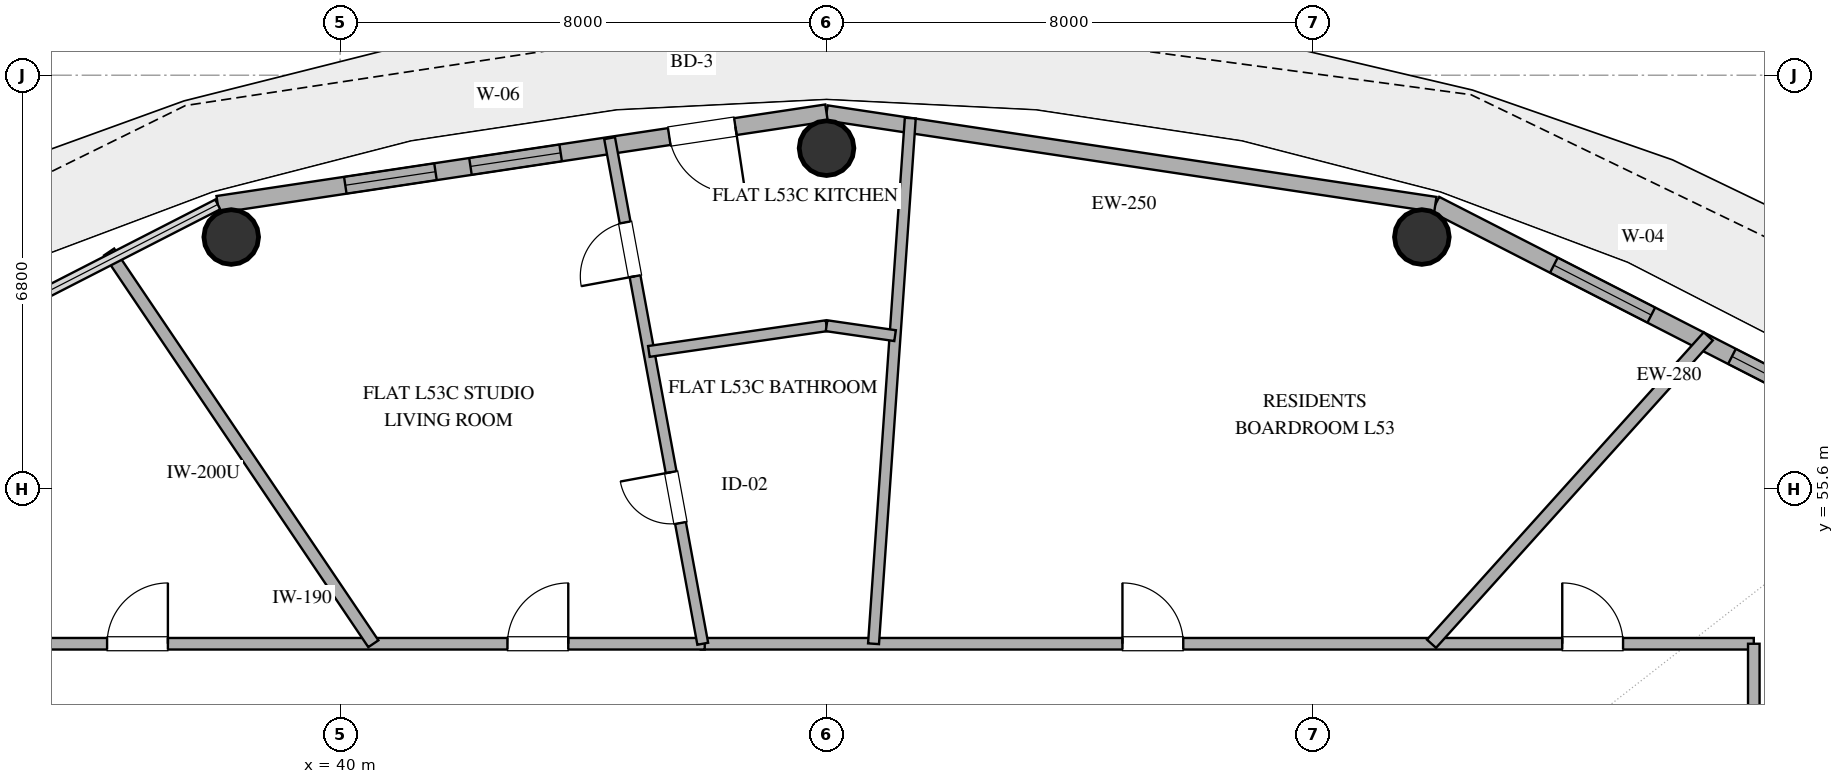
"""IFC4 building model, lengths in metres.
Left out: names, types, materials, properties, quantities, classifications, styles, units other than length and angle.
Written with IfcOpenShell. Run it as: python <this file> out.ifc"""

import sys

from ifc_helpers import new_model, si_unit, direction, frame, frame_2d, origin, origin_2d, place, context, subcontext, project, spatial, rectangle, hollow_circle, extrude, element, fill, save


model = new_model("IFC4")
c1 = context("Model", 3, precision=1e-05, world=origin(), true_north=direction((0.0, 1.0)))
c2 = subcontext(c1, "Body", "Model", "MODEL_VIEW")
j1 = project(units=[si_unit("LENGTHUNIT", "METRE"), si_unit("PLANEANGLEUNIT", "RADIAN")], contexts=[c1])
p1 = place(None, origin())
s1 = spatial("IfcSite", under=j1, at=p1, CompositionType="ELEMENT")
p2 = place(p1, origin())
s2 = spatial("IfcBuilding", under=s1, at=p2, CompositionType="ELEMENT")
p3 = place(p2, frame((0.0, 0.0, 210.0)))
s3 = spatial("IfcBuildingStorey", under=s2, at=p3, CompositionType="ELEMENT", Elevation=210.0)
for number, where, z_axis, x_axis in (
    (1, (57.791, 59.739, 0.0), (0.0, 0.0, 1.0), (1.0, 0.0, 0.0)),
    (2, (48.0, 61.2, 0.0), (0.0, 0.0, 1.0), (1.0, 0.0, 0.0)),
    (3, (38.209, 59.739, 0.0), (0.0, 0.0, 1.0), (1.0, 0.0, 0.0)),
):
    element("IfcColumn", number, at=place(p3, frame(where, z_axis=z_axis, x_axis=x_axis)), inside=s3, PredefinedType="COLUMN", context=c2, shape_type="SweptSolid", body=[
        extrude(hollow_circle(Radius=0.45, WallThickness=0.025, at=origin_2d()), origin(), (0.0, 0.0, 1.0), 3.36),
    ])
p4 = place(p3, frame((66.383, 55.987, 0.0), z_axis=(0.0, 0.0, 1.0), x_axis=(-0.890007394051, 0.455946091699, 0.0)))
e4 = element("IfcWall", 4, at=p4, inside=s3, PredefinedType="SOLIDWALL", context=c2, shape_type="SweptSolid", body=[
    extrude(rectangle(XDim=9.404, YDim=0.28, at=frame_2d((4.702, 0.0))), origin(), (0.0, 0.0, 1.0), 3.36),
])
p5 = place(p4, frame((1.823, 0.0, 0.85)))
e5 = element("IfcOpeningElement", 5, at=p5, cuts=e4, PredefinedType="OPENING", context=c2, shape_type="SweptSolid", body=[
    extrude(rectangle(XDim=2.1, YDim=2.2, at=frame_2d((1.05, 1.1))), frame((0.0, 0.15, 0.0), z_axis=(0.0, -1.0, 0.0), x_axis=(1.0, 0.0, 0.0)), (0.0, 0.0, 1.0), 0.3),
])
p6 = place(p4, frame((5.414, 0.0, 0.85)))
e6 = element("IfcOpeningElement", 6, at=p6, cuts=e4, PredefinedType="OPENING", context=c2, shape_type="SweptSolid", body=[
    extrude(rectangle(XDim=1.8, YDim=2.2, at=frame_2d((0.9, 1.1))), frame((0.0, 0.15, 0.0), z_axis=(0.0, -1.0, 0.0), x_axis=(1.0, 0.0, 0.0)), (0.0, 0.0, 1.0), 0.3),
])
p7 = place(p3, frame((58.013, 60.274, 0.0), z_axis=(0.0, 0.0, 1.0), x_axis=(-0.988882522213, 0.148698881169, 0.0)))
e7 = element("IfcWall", 7, at=p7, inside=s3, PredefinedType="SOLIDWALL", context=c2, shape_type="SweptSolid", body=[
    extrude(rectangle(XDim=10.125, YDim=0.25, at=frame_2d((5.062, 0.0))), origin(), (0.0, 0.0, 1.0), 3.36),
])
p8 = place(p3, frame((48.0, 61.78, 0.0), z_axis=(0.0, 0.0, 1.0), x_axis=(-0.988882522213, -0.148698881169, 0.0)))
e8 = element("IfcWall", 8, at=p8, inside=s3, PredefinedType="SOLIDWALL", context=c2, shape_type="SweptSolid", body=[
    extrude(rectangle(XDim=10.125, YDim=0.28, at=frame_2d((5.062, 0.0))), origin(), (0.0, 0.0, 1.0), 3.36),
])
p9 = place(p8, frame((1.516, 0.0, 0.0)))
e9 = element("IfcOpeningElement", 9, at=p9, cuts=e8, PredefinedType="OPENING", context=c2, shape_type="SweptSolid", body=[
    extrude(rectangle(XDim=1.1, YDim=2.25, at=frame_2d((0.55, 1.125))), frame((0.0, 0.15, 0.0), z_axis=(0.0, -1.0, 0.0), x_axis=(1.0, 0.0, 0.0)), (0.0, 0.0, 1.0), 0.3),
])
p10 = place(p8, frame((4.422, 0.0, 0.85)))
e10 = element("IfcOpeningElement", 10, at=p10, cuts=e8, PredefinedType="OPENING", context=c2, shape_type="SweptSolid", body=[
    extrude(rectangle(XDim=1.5, YDim=2.0, at=frame_2d((0.75, 1.0))), frame((0.0, 0.15, 0.0), z_axis=(0.0, -1.0, 0.0), x_axis=(1.0, 0.0, 0.0)), (0.0, 0.0, 1.0), 0.3),
])
p11 = place(p8, frame((6.504, 0.0, 0.85)))
e11 = element("IfcOpeningElement", 11, at=p11, cuts=e8, PredefinedType="OPENING", context=c2, shape_type="SweptSolid", body=[
    extrude(rectangle(XDim=1.5, YDim=2.0, at=frame_2d((0.75, 1.0))), frame((0.0, 0.15, 0.0), z_axis=(0.0, -1.0, 0.0), x_axis=(1.0, 0.0, 0.0)), (0.0, 0.0, 1.0), 0.3),
])
p12 = place(p3, frame((45.931, 53.05, 0.0), z_axis=(0.0, 0.0, 1.0), x_axis=(1.0, 0.0, 0.0)))
e12 = element("IfcWall", 12, at=p12, inside=s3, PredefinedType="PARTITIONING", context=c2, shape_type="SweptSolid", body=[
    extrude(rectangle(XDim=17.319, YDim=0.19, at=frame_2d((8.659, 0.0))), origin(), (0.0, 0.0, 1.0), 2.72),
])
p13 = place(p12, frame((6.935, 0.0, 0.0)))
e13 = element("IfcOpeningElement", 13, at=p13, cuts=e12, PredefinedType="OPENING", context=c2, shape_type="SweptSolid", body=[
    extrude(rectangle(XDim=1.0, YDim=2.2, at=frame_2d((0.5, 1.1))), frame((0.0, 0.105, 0.0), z_axis=(0.0, -1.0, 0.0), x_axis=(1.0, 0.0, 0.0)), (0.0, 0.0, 1.0), 0.21),
])
p14 = place(p12, frame((14.168, 0.0, 0.0)))
e14 = element("IfcOpeningElement", 14, at=p14, cuts=e12, PredefinedType="OPENING", context=c2, shape_type="SweptSolid", body=[
    extrude(rectangle(XDim=1.0, YDim=2.2, at=frame_2d((0.5, 1.1))), frame((0.0, 0.105, 0.0), z_axis=(0.0, -1.0, 0.0), x_axis=(1.0, 0.0, 0.0)), (0.0, 0.0, 1.0), 0.21),
])
p15 = place(p3, frame((32.75, 53.05, 0.0), z_axis=(0.0, 0.0, 1.0), x_axis=(1.0, 0.0, 0.0)))
e15 = element("IfcWall", 15, at=p15, inside=s3, PredefinedType="PARTITIONING", context=c2, shape_type="SweptSolid", body=[
    extrude(rectangle(XDim=13.247, YDim=0.19, at=frame_2d((6.623, 0.0))), origin(), (0.0, 0.0, 1.0), 2.72),
])
p16 = place(p15, frame((3.417, 0.0, 0.0)))
e16 = element("IfcOpeningElement", 16, at=p16, cuts=e15, PredefinedType="OPENING", context=c2, shape_type="SweptSolid", body=[
    extrude(rectangle(XDim=1.0, YDim=2.2, at=frame_2d((0.5, 1.1))), frame((0.0, 0.105, 0.0), z_axis=(0.0, -1.0, 0.0), x_axis=(1.0, 0.0, 0.0)), (0.0, 0.0, 1.0), 0.21),
])
p17 = place(p15, frame((10.002, 0.0, 0.0)))
e17 = element("IfcOpeningElement", 17, at=p17, cuts=e15, PredefinedType="OPENING", context=c2, shape_type="SweptSolid", body=[
    extrude(rectangle(XDim=1.0, YDim=2.2, at=frame_2d((0.5, 1.1))), frame((0.0, 0.105, 0.0), z_axis=(0.0, -1.0, 0.0), x_axis=(1.0, 0.0, 0.0)), (0.0, 0.0, 1.0), 0.21),
])
p18 = place(p3, frame((40.547, 53.05, 0.0), z_axis=(0.0, 0.0, 1.0), x_axis=(-0.559208454265, 0.8290270832, 0.0)))
e18 = element("IfcWall", 18, at=p18, inside=s3, PredefinedType="PARTITIONING", context=c2, shape_type="SweptSolid", body=[
    extrude(rectangle(XDim=7.771, YDim=0.2, at=frame_2d((3.886, 0.0))), origin(), (0.0, 0.0, 1.0), 2.72),
])
p19 = place(p3, frame((57.949, 53.05, 0.0), z_axis=(0.0, 0.0, 1.0), x_axis=(0.66913524162, 0.743140651844, 0.0)))
e19 = element("IfcWall", 19, at=p19, inside=s3, PredefinedType="PARTITIONING", context=c2, shape_type="SweptSolid", body=[
    extrude(rectangle(XDim=6.802, YDim=0.2, at=frame_2d((3.401, 0.0))), origin(), (0.0, 0.0, 1.0), 2.72),
])
p20 = place(p3, frame((48.773, 53.05, 0.0), z_axis=(0.0, 0.0, 1.0), x_axis=(0.069763237321, 0.997563577281, 0.0)))
e20 = element("IfcWall", 20, at=p20, inside=s3, PredefinedType="PLUMBINGWALL", context=c2, shape_type="SweptSolid", body=[
    extrude(rectangle(XDim=8.665, YDim=0.18, at=frame_2d((4.333, 0.0))), origin(), (0.0, 0.0, 1.0), 2.72),
])
p21 = place(p3, frame((45.964, 53.05, 0.0), z_axis=(0.0, 0.0, 1.0), x_axis=(-0.181227840828, 0.983441136881, 0.0)))
e21 = element("IfcWall", 21, at=p21, inside=s3, PredefinedType="PLUMBINGWALL", context=c2, shape_type="SweptSolid", body=[
    extrude(rectangle(XDim=8.455, YDim=0.18, at=frame_2d((4.227, 0.0))), origin(), (0.0, 0.0, 1.0), 2.72),
])
p22 = place(p21, frame((2.019, 0.0, 0.0)))
e22 = element("IfcOpeningElement", 22, at=p22, cuts=e21, PredefinedType="OPENING", context=c2, shape_type="SweptSolid", body=[
    extrude(rectangle(XDim=0.85, YDim=2.1, at=frame_2d((0.425, 1.05))), frame((0.0, 0.1, 0.0), z_axis=(0.0, -1.0, 0.0), x_axis=(1.0, 0.0, 0.0)), (0.0, 0.0, 1.0), 0.2),
])
p23 = place(p21, frame((6.145, 0.0, 0.0)))
e23 = element("IfcOpeningElement", 23, at=p23, cuts=e21, PredefinedType="OPENING", context=c2, shape_type="SweptSolid", body=[
    extrude(rectangle(XDim=0.9, YDim=2.1, at=frame_2d((0.45, 1.05))), frame((0.0, 0.1, 0.0), z_axis=(0.0, -1.0, 0.0), x_axis=(1.0, 0.0, 0.0)), (0.0, 0.0, 1.0), 0.2),
])
p24 = place(p3, frame((63.25, 45.35, 0.0), z_axis=(0.0, 0.0, 1.0), x_axis=(0.0, 1.0, 0.0)))
e24 = element("IfcWall", 24, at=p24, inside=s3, PredefinedType="PARTITIONING", context=c2, shape_type="SweptSolid", body=[
    extrude(rectangle(XDim=7.7, YDim=0.19, at=frame_2d((3.85, 0.0))), origin(), (0.0, 0.0, 1.0), 2.72),
])
p25 = place(p3, frame((45.078, 57.857, 0.0), z_axis=(0.0, 0.0, 1.0), x_axis=(0.989678113628, 0.143308169361, 0.0)))
e25 = element("IfcWall", 25, at=p25, inside=s3, PredefinedType="PLUMBINGWALL", context=c2, shape_type="SweptSolid", body=[
    extrude(rectangle(XDim=2.952, YDim=0.18, at=frame_2d((1.476, 0.0))), origin(), (0.0, 0.0, 1.0), 2.72),
])
p26 = place(p3, frame((48.0, 58.28, 0.0), z_axis=(0.0, 0.0, 1.0), x_axis=(0.989660157939, -0.143432115611, 0.0)))
e26 = element("IfcWall", 26, at=p26, inside=s3, PredefinedType="PLUMBINGWALL", context=c2, shape_type="SweptSolid", body=[
    extrude(rectangle(XDim=1.139, YDim=0.18, at=frame_2d((0.569, 0.0))), origin(), (0.0, 0.0, 1.0), 2.72),
])
p27 = place(p5, origin())
e27 = element("IfcWindow", 27, at=p27, inside=s3, PartitioningType="SINGLE_PANEL", PredefinedType="WINDOW", context=c2, shape_type="SweptSolid", body=[
    extrude(rectangle(XDim=2.1, YDim=2.2, at=frame_2d((1.05, 1.1))), frame((0.0, 0.03, 0.0), z_axis=(0.0, -1.0, 0.0), x_axis=(1.0, 0.0, 0.0)), (0.0, 0.0, 1.0), 0.06),
])
fill(e5, e27)
p28 = place(p6, origin())
e28 = element("IfcWindow", 28, at=p28, inside=s3, PartitioningType="SINGLE_PANEL", PredefinedType="WINDOW", context=c2, shape_type="SweptSolid", body=[
    extrude(rectangle(XDim=1.8, YDim=2.2, at=frame_2d((0.9, 1.1))), frame((0.0, 0.03, 0.0), z_axis=(0.0, -1.0, 0.0), x_axis=(1.0, 0.0, 0.0)), (0.0, 0.0, 1.0), 0.06),
])
fill(e6, e28)
p29 = place(p9, origin())
e29 = element("IfcDoor", 29, at=p29, inside=s3, OperationType="SINGLE_SWING_LEFT", PredefinedType="DOOR", context=c2, shape_type="SweptSolid", body=[
    extrude(rectangle(XDim=1.1, YDim=2.25, at=frame_2d((0.55, 1.125))), frame((0.0, 0.025, 0.0), z_axis=(0.0, -1.0, 0.0), x_axis=(1.0, 0.0, 0.0)), (0.0, 0.0, 1.0), 0.05),
])
fill(e9, e29)
p30 = place(p10, origin())
e30 = element("IfcWindow", 30, at=p30, inside=s3, PartitioningType="SINGLE_PANEL", PredefinedType="WINDOW", context=c2, shape_type="SweptSolid", body=[
    extrude(rectangle(XDim=1.5, YDim=2.0, at=frame_2d((0.75, 1.0))), frame((0.0, 0.03, 0.0), z_axis=(0.0, -1.0, 0.0), x_axis=(1.0, 0.0, 0.0)), (0.0, 0.0, 1.0), 0.06),
])
fill(e10, e30)
p31 = place(p11, origin())
e31 = element("IfcWindow", 31, at=p31, inside=s3, PartitioningType="SINGLE_PANEL", PredefinedType="WINDOW", context=c2, shape_type="SweptSolid", body=[
    extrude(rectangle(XDim=1.5, YDim=2.0, at=frame_2d((0.75, 1.0))), frame((0.0, 0.03, 0.0), z_axis=(0.0, -1.0, 0.0), x_axis=(1.0, 0.0, 0.0)), (0.0, 0.0, 1.0), 0.06),
])
fill(e11, e31)
p32 = place(p13, origin())
e32 = element("IfcDoor", 32, at=p32, inside=s3, OperationType="SINGLE_SWING_LEFT", PredefinedType="DOOR", context=c2, shape_type="SweptSolid", body=[
    extrude(rectangle(XDim=1.0, YDim=2.2, at=frame_2d((0.5, 1.1))), frame((0.0, 0.025, 0.0), z_axis=(0.0, -1.0, 0.0), x_axis=(1.0, 0.0, 0.0)), (0.0, 0.0, 1.0), 0.05),
])
fill(e13, e32)
p33 = place(p14, origin())
e33 = element("IfcDoor", 33, at=p33, inside=s3, OperationType="SINGLE_SWING_LEFT", PredefinedType="DOOR", context=c2, shape_type="SweptSolid", body=[
    extrude(rectangle(XDim=1.0, YDim=2.2, at=frame_2d((0.5, 1.1))), frame((0.0, 0.025, 0.0), z_axis=(0.0, -1.0, 0.0), x_axis=(1.0, 0.0, 0.0)), (0.0, 0.0, 1.0), 0.05),
])
fill(e14, e33)
p34 = place(p16, origin())
e34 = element("IfcDoor", 34, at=p34, inside=s3, OperationType="SINGLE_SWING_RIGHT", PredefinedType="DOOR", context=c2, shape_type="SweptSolid", body=[
    extrude(rectangle(XDim=1.0, YDim=2.2, at=frame_2d((0.5, 1.1))), frame((0.0, 0.025, 0.0), z_axis=(0.0, -1.0, 0.0), x_axis=(1.0, 0.0, 0.0)), (0.0, 0.0, 1.0), 0.05),
])
fill(e16, e34)
p35 = place(p17, origin())
e35 = element("IfcDoor", 35, at=p35, inside=s3, OperationType="SINGLE_SWING_RIGHT", PredefinedType="DOOR", context=c2, shape_type="SweptSolid", body=[
    extrude(rectangle(XDim=1.0, YDim=2.2, at=frame_2d((0.5, 1.1))), frame((0.0, 0.025, 0.0), z_axis=(0.0, -1.0, 0.0), x_axis=(1.0, 0.0, 0.0)), (0.0, 0.0, 1.0), 0.05),
])
fill(e17, e35)
p36 = place(p22, origin())
e36 = element("IfcDoor", 36, at=p36, inside=s3, OperationType="SINGLE_SWING_RIGHT", PredefinedType="DOOR", context=c2, shape_type="SweptSolid", body=[
    extrude(rectangle(XDim=0.85, YDim=2.1, at=frame_2d((0.425, 1.05))), frame((0.0, 0.025, 0.0), z_axis=(0.0, -1.0, 0.0), x_axis=(1.0, 0.0, 0.0)), (0.0, 0.0, 1.0), 0.05),
])
fill(e22, e36)
p37 = place(p23, origin())
e37 = element("IfcDoor", 37, at=p37, inside=s3, OperationType="SINGLE_SWING_LEFT", PredefinedType="DOOR", context=c2, shape_type="SweptSolid", body=[
    extrude(rectangle(XDim=0.9, YDim=2.1, at=frame_2d((0.45, 1.05))), frame((0.0, 0.025, 0.0), z_axis=(0.0, -1.0, 0.0), x_axis=(1.0, 0.0, 0.0)), (0.0, 0.0, 1.0), 0.05),
])
fill(e23, e37)
save(model, sys.argv[1])
